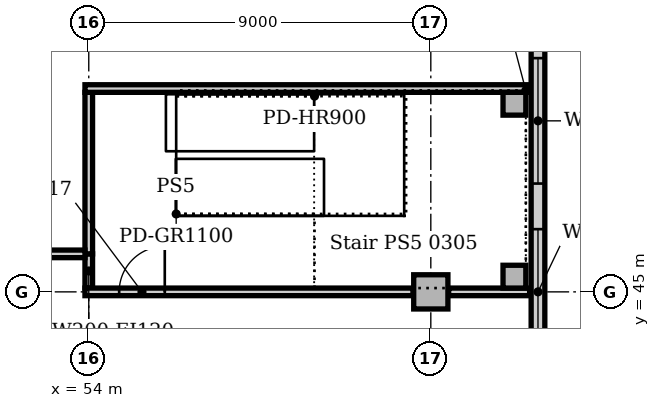
"""IFC4 building model, lengths in metres.
Left out: names, types, materials, properties, quantities, classifications, styles, units other than length and angle.
Written with IfcOpenShell. Run it as: python <this file> out.ifc"""

import sys

from ifc_helpers import new_model, si_unit, direction, frame, frame_2d, origin, origin_2d, place, context, subcontext, project, spatial, rectangle, extrude, element, fill, save


model = new_model("IFC4")
c1 = context("Model", 3, precision=1e-05, world=origin(), true_north=direction((0.0, 1.0)))
c2 = subcontext(c1, "Body", "Model", "MODEL_VIEW")
j1 = project(units=[si_unit("LENGTHUNIT", "METRE"), si_unit("PLANEANGLEUNIT", "RADIAN")], contexts=[c1])
p1 = place(None, origin())
s1 = spatial("IfcSite", under=j1, at=p1, CompositionType="ELEMENT")
p2 = place(p1, origin())
s2 = spatial("IfcBuilding", under=s1, at=p2, CompositionType="ELEMENT")
p3 = place(p2, frame((0.0, 0.0, 16.0)))
s3 = spatial("IfcBuildingStorey", under=s2, at=p3, CompositionType="ELEMENT", Elevation=16.0)
p4 = place(p3, frame((63.0, 45.0, 0.0), z_axis=(0.0, 0.0, 1.0), x_axis=(1.0, 0.0, 0.0)))
e1 = element("IfcColumn", 1, at=p4, inside=s3, PredefinedType="COLUMN", context=c2, shape_type="SweptSolid", body=[
    extrude(rectangle(XDim=0.9, YDim=0.9, at=origin_2d()), origin(), (0.0, 0.0, 1.0), 4.7),
])
p5 = place(p3, frame((65.82, -9.0, 0.0), z_axis=(0.0, 0.0, 1.0), x_axis=(0.0, 1.0, 0.0)))
e2 = element("IfcWall", 2, at=p5, inside=s3, PredefinedType="STANDARD", context=c2, shape_type="SweptSolid", body=[
    extrude(rectangle(XDim=63.0, YDim=0.36, at=frame_2d((31.5, 0.0))), origin(), (0.0, 0.0, 1.0), 4.7),
])
p6 = place(p5, frame((2.85, 0.0, 0.9)))
e3 = element("IfcOpeningElement", 3, at=p6, cuts=e2, PredefinedType="OPENING", context=c2, shape_type="SweptSolid", body=[
    extrude(rectangle(XDim=3.3, YDim=2.4, at=frame_2d((1.65, 1.2))), frame((0.0, 0.19, 0.0), z_axis=(0.0, -1.0, 0.0), x_axis=(1.0, 0.0, 0.0)), (0.0, 0.0, 1.0), 0.38),
])
p7 = place(p5, frame((7.35, 0.0, 0.9)))
e4 = element("IfcOpeningElement", 4, at=p7, cuts=e2, PredefinedType="OPENING", context=c2, shape_type="SweptSolid", body=[
    extrude(rectangle(XDim=3.3, YDim=2.4, at=frame_2d((1.65, 1.2))), frame((0.0, 0.19, 0.0), z_axis=(0.0, -1.0, 0.0), x_axis=(1.0, 0.0, 0.0)), (0.0, 0.0, 1.0), 0.38),
])
p8 = place(p5, frame((11.85, 0.0, 0.9)))
e5 = element("IfcOpeningElement", 5, at=p8, cuts=e2, PredefinedType="OPENING", context=c2, shape_type="SweptSolid", body=[
    extrude(rectangle(XDim=3.3, YDim=2.4, at=frame_2d((1.65, 1.2))), frame((0.0, 0.19, 0.0), z_axis=(0.0, -1.0, 0.0), x_axis=(1.0, 0.0, 0.0)), (0.0, 0.0, 1.0), 0.38),
])
p9 = place(p5, frame((16.35, 0.0, 0.9)))
e6 = element("IfcOpeningElement", 6, at=p9, cuts=e2, PredefinedType="OPENING", context=c2, shape_type="SweptSolid", body=[
    extrude(rectangle(XDim=3.3, YDim=2.4, at=frame_2d((1.65, 1.2))), frame((0.0, 0.19, 0.0), z_axis=(0.0, -1.0, 0.0), x_axis=(1.0, 0.0, 0.0)), (0.0, 0.0, 1.0), 0.38),
])
p10 = place(p5, frame((20.85, 0.0, 0.9)))
e7 = element("IfcOpeningElement", 7, at=p10, cuts=e2, PredefinedType="OPENING", context=c2, shape_type="SweptSolid", body=[
    extrude(rectangle(XDim=3.3, YDim=2.4, at=frame_2d((1.65, 1.2))), frame((0.0, 0.19, 0.0), z_axis=(0.0, -1.0, 0.0), x_axis=(1.0, 0.0, 0.0)), (0.0, 0.0, 1.0), 0.38),
])
p11 = place(p5, frame((25.35, 0.0, 0.9)))
e8 = element("IfcOpeningElement", 8, at=p11, cuts=e2, PredefinedType="OPENING", context=c2, shape_type="SweptSolid", body=[
    extrude(rectangle(XDim=3.3, YDim=2.4, at=frame_2d((1.65, 1.2))), frame((0.0, 0.19, 0.0), z_axis=(0.0, -1.0, 0.0), x_axis=(1.0, 0.0, 0.0)), (0.0, 0.0, 1.0), 0.38),
])
p12 = place(p5, frame((29.85, 0.0, 0.9)))
e9 = element("IfcOpeningElement", 9, at=p12, cuts=e2, PredefinedType="OPENING", context=c2, shape_type="SweptSolid", body=[
    extrude(rectangle(XDim=3.3, YDim=2.4, at=frame_2d((1.65, 1.2))), frame((0.0, 0.19, 0.0), z_axis=(0.0, -1.0, 0.0), x_axis=(1.0, 0.0, 0.0)), (0.0, 0.0, 1.0), 0.38),
])
p13 = place(p5, frame((34.35, 0.0, 0.9)))
e10 = element("IfcOpeningElement", 10, at=p13, cuts=e2, PredefinedType="OPENING", context=c2, shape_type="SweptSolid", body=[
    extrude(rectangle(XDim=3.3, YDim=2.4, at=frame_2d((1.65, 1.2))), frame((0.0, 0.19, 0.0), z_axis=(0.0, -1.0, 0.0), x_axis=(1.0, 0.0, 0.0)), (0.0, 0.0, 1.0), 0.38),
])
p14 = place(p5, frame((38.85, 0.0, 0.9)))
e11 = element("IfcOpeningElement", 11, at=p14, cuts=e2, PredefinedType="OPENING", context=c2, shape_type="SweptSolid", body=[
    extrude(rectangle(XDim=3.3, YDim=2.4, at=frame_2d((1.65, 1.2))), frame((0.0, 0.19, 0.0), z_axis=(0.0, -1.0, 0.0), x_axis=(1.0, 0.0, 0.0)), (0.0, 0.0, 1.0), 0.38),
])
p15 = place(p5, frame((43.35, 0.0, 0.9)))
e12 = element("IfcOpeningElement", 12, at=p15, cuts=e2, PredefinedType="OPENING", context=c2, shape_type="SweptSolid", body=[
    extrude(rectangle(XDim=3.3, YDim=2.4, at=frame_2d((1.65, 1.2))), frame((0.0, 0.19, 0.0), z_axis=(0.0, -1.0, 0.0), x_axis=(1.0, 0.0, 0.0)), (0.0, 0.0, 1.0), 0.38),
])
p16 = place(p5, frame((47.85, 0.0, 0.9)))
e13 = element("IfcOpeningElement", 13, at=p16, cuts=e2, PredefinedType="OPENING", context=c2, shape_type="SweptSolid", body=[
    extrude(rectangle(XDim=3.3, YDim=2.4, at=frame_2d((1.65, 1.2))), frame((0.0, 0.19, 0.0), z_axis=(0.0, -1.0, 0.0), x_axis=(1.0, 0.0, 0.0)), (0.0, 0.0, 1.0), 0.38),
])
p17 = place(p5, frame((52.35, 0.0, 0.9)))
e14 = element("IfcOpeningElement", 14, at=p17, cuts=e2, PredefinedType="OPENING", context=c2, shape_type="SweptSolid", body=[
    extrude(rectangle(XDim=3.3, YDim=2.4, at=frame_2d((1.65, 1.2))), frame((0.0, 0.19, 0.0), z_axis=(0.0, -1.0, 0.0), x_axis=(1.0, 0.0, 0.0)), (0.0, 0.0, 1.0), 0.38),
])
p18 = place(p5, frame((56.85, 0.0, 0.9)))
e15 = element("IfcOpeningElement", 15, at=p18, cuts=e2, PredefinedType="OPENING", context=c2, shape_type="SweptSolid", body=[
    extrude(rectangle(XDim=3.3, YDim=2.4, at=frame_2d((1.65, 1.2))), frame((0.0, 0.19, 0.0), z_axis=(0.0, -1.0, 0.0), x_axis=(1.0, 0.0, 0.0)), (0.0, 0.0, 1.0), 0.38),
])
for number, where, z_axis, x_axis in (
    (16, (65.2, 49.95, 0.0), (0.0, 0.0, 1.0), (1.0, 0.0, 0.0)),
    (17, (65.2, 45.4, 0.0), (0.0, 0.0, 1.0), (1.0, 0.0, 0.0)),
):
    element("IfcColumn", number, at=place(p3, frame(where, z_axis=z_axis, x_axis=x_axis)), inside=s3, PredefinedType="COLUMN", context=c2, shape_type="SweptSolid", body=[
        extrude(rectangle(XDim=0.6, YDim=0.6, at=origin_2d()), origin(), (0.0, 0.0, 1.0), 5.0),
    ])
p19 = place(p3, frame((54.0, 45.1, 0.0), z_axis=(0.0, 0.0, 1.0), x_axis=(0.0, 1.0, 0.0)))
e18 = element("IfcWall", 18, at=p19, inside=s3, PredefinedType="SOLIDWALL", context=c2, shape_type="SweptSolid", body=[
    extrude(rectangle(XDim=0.9, YDim=0.2, at=frame_2d((0.45, 0.0))), origin(), (0.0, 0.0, 1.0), 4.7),
])
p20 = place(p3, frame((53.9, 45.0, 0.0), z_axis=(0.0, 0.0, 1.0), x_axis=(1.0, 0.0, 0.0)))
e19 = element("IfcWall", 19, at=p20, inside=s3, PredefinedType="SOLIDWALL", context=c2, shape_type="SweptSolid", body=[
    extrude(rectangle(XDim=8.63, YDim=0.2, at=frame_2d((4.315, 0.0))), origin(), (0.0, 0.0, 1.0), 4.7),
])
p21 = place(p20, frame((0.9, 0.0, 0.0)))
e20 = element("IfcOpeningElement", 20, at=p21, cuts=e19, PredefinedType="OPENING", context=c2, shape_type="SweptSolid", body=[
    extrude(rectangle(XDim=1.2, YDim=2.1, at=frame_2d((0.6, 1.05))), frame((0.0, 0.11, 0.0), z_axis=(0.0, -1.0, 0.0), x_axis=(1.0, 0.0, 0.0)), (0.0, 0.0, 1.0), 0.22),
])
p22 = place(p3, frame((63.47, 45.0, 0.0), z_axis=(0.0, 0.0, 1.0), x_axis=(1.0, 0.0, 0.0)))
e21 = element("IfcWall", 21, at=p22, inside=s3, PredefinedType="SOLIDWALL", context=c2, shape_type="SweptSolid", body=[
    extrude(rectangle(XDim=2.13, YDim=0.2, at=frame_2d((1.065, 0.0))), origin(), (0.0, 0.0, 1.0), 4.7),
])
p23 = place(p3, frame((54.0, 46.0, 0.0), z_axis=(0.0, 0.0, 1.0), x_axis=(0.0, 1.0, 0.0)))
e22 = element("IfcWall", 22, at=p23, inside=s3, PredefinedType="SOLIDWALL", context=c2, shape_type="SweptSolid", body=[
    extrude(rectangle(XDim=4.25, YDim=0.2, at=frame_2d((2.125, 0.0))), origin(), (0.0, 0.0, 1.0), 4.7),
])
p24 = place(p3, frame((53.9, 50.35, 0.0), z_axis=(0.0, 0.0, 1.0), x_axis=(1.0, 0.0, 0.0)))
e23 = element("IfcWall", 23, at=p24, inside=s3, PredefinedType="SOLIDWALL", context=c2, shape_type="SweptSolid", body=[
    extrude(rectangle(XDim=11.7, YDim=0.2, at=frame_2d((5.85, 0.0))), origin(), (0.0, 0.0, 1.0), 4.7),
])
p25 = place(p3, frame((45.1, 46.0, 0.0), z_axis=(0.0, 0.0, 1.0), x_axis=(1.0, 0.0, 0.0)))
e24 = element("IfcWall", 24, at=p25, inside=s3, PredefinedType="PARTITIONING", context=c2, shape_type="SweptSolid", body=[
    extrude(rectangle(XDim=8.8, YDim=0.2, at=frame_2d((4.4, 0.0))), origin(), (0.0, 0.0, 1.0), 4.7),
])
p26 = place(p25, frame((3.5, 0.0, 0.0)))
e25 = element("IfcOpeningElement", 25, at=p26, cuts=e24, PredefinedType="OPENING", context=c2, shape_type="SweptSolid", body=[
    extrude(rectangle(XDim=1.8, YDim=2.1, at=frame_2d((0.9, 1.05))), frame((0.0, 0.11, 0.0), z_axis=(0.0, -1.0, 0.0), x_axis=(1.0, 0.0, 0.0)), (0.0, 0.0, 1.0), 0.22),
])
p27 = place(p17, origin())
e26 = element("IfcWindow", 26, at=p27, inside=s3, PartitioningType="SINGLE_PANEL", PredefinedType="WINDOW", context=c2, shape_type="SweptSolid", body=[
    extrude(rectangle(XDim=3.3, YDim=2.4, at=frame_2d((1.65, 1.2))), frame((0.0, 0.13, 0.0), z_axis=(0.0, -1.0, 0.0), x_axis=(1.0, 0.0, 0.0)), (0.0, 0.0, 1.0), 0.06),
])
fill(e14, e26)
p28 = place(p18, origin())
e27 = element("IfcWindow", 27, at=p28, inside=s3, PartitioningType="SINGLE_PANEL", PredefinedType="WINDOW", context=c2, shape_type="SweptSolid", body=[
    extrude(rectangle(XDim=3.3, YDim=2.4, at=frame_2d((1.65, 1.2))), frame((0.0, 0.13, 0.0), z_axis=(0.0, -1.0, 0.0), x_axis=(1.0, 0.0, 0.0)), (0.0, 0.0, 1.0), 0.06),
])
fill(e15, e27)
p29 = place(p21, origin())
e28 = element("IfcDoor", 28, at=p29, inside=s3, OperationType="SINGLE_SWING_RIGHT", PredefinedType="DOOR", context=c2, shape_type="SweptSolid", body=[
    extrude(rectangle(XDim=1.2, YDim=2.1, at=frame_2d((0.6, 1.05))), frame((0.0, 0.025, 0.0), z_axis=(0.0, -1.0, 0.0), x_axis=(1.0, 0.0, 0.0)), (0.0, 0.0, 1.0), 0.05),
])
fill(e20, e28)
save(model, sys.argv[1])
